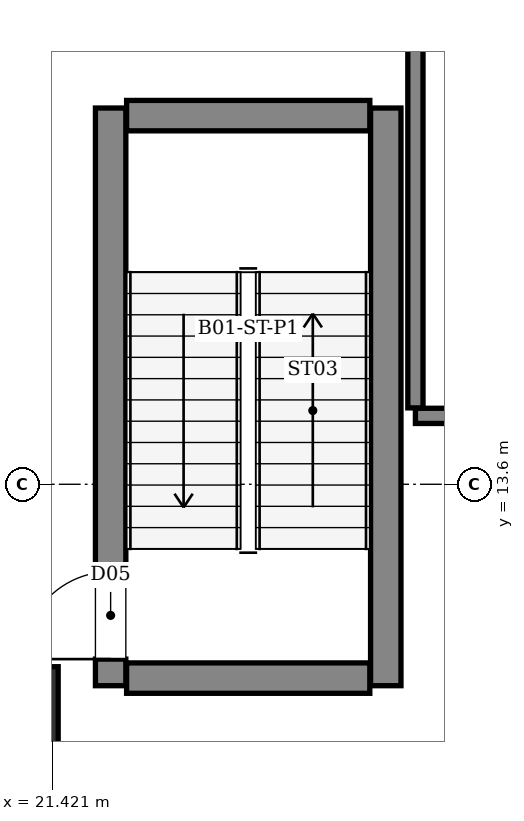
"""IFC4 building model, lengths in metres.
Left out: names, types, materials, properties, quantities, classifications, styles, units other than length and angle.
Written with IfcOpenShell. Run it as: python <this file> out.ifc"""

import sys

from ifc_helpers import new_model, si_unit, direction, frame, frame_2d, origin, origin_2d, place, context, subcontext, project, spatial, rectangle, extrude, element, fill, save


model = new_model("IFC4")
c1 = context("Model", 3, precision=1e-05, world=origin(), true_north=direction((0.0, 1.0)))
c2 = subcontext(c1, "Body", "Model", "MODEL_VIEW")
j1 = project(units=[si_unit("LENGTHUNIT", "METRE"), si_unit("PLANEANGLEUNIT", "RADIAN")], contexts=[c1])
p1 = place(None, origin())
s1 = spatial("IfcSite", under=j1, at=p1, CompositionType="ELEMENT")
p2 = place(p1, origin())
s2 = spatial("IfcBuilding", under=s1, at=p2, CompositionType="ELEMENT")
p3 = place(p2, frame((0.0, 0.0, -4.8)))
s3 = spatial("IfcBuildingStorey", under=s2, at=p3, CompositionType="ELEMENT", Elevation=-4.8)
p4 = place(p3, frame((20.8, 10.5, 0.0), z_axis=(0.0, 0.0, 1.0), x_axis=(1.0, 0.0, 0.0)))
e1 = element("IfcColumn", 1, at=p4, inside=s3, PredefinedType="COLUMN", context=c2, shape_type="SweptSolid", body=[
    extrude(rectangle(XDim=1.4, YDim=1.4, at=origin_2d()), origin(), (0.0, 0.0, 1.0), 4.8),
])
p5 = place(p3, frame((22.19, 10.95, 0.0), z_axis=(0.0, 0.0, 1.0), x_axis=(0.0, 1.0, 0.0)))
e2 = element("IfcWall", 2, at=p5, inside=s3, PredefinedType="SHEAR", context=c2, shape_type="SweptSolid", body=[
    extrude(rectangle(XDim=7.6, YDim=0.4, at=frame_2d((3.8, 0.0))), origin(), (0.0, 0.0, 1.0), 4.35),
])
p6 = place(p5, frame((0.35, 0.0, 0.0)))
e3 = element("IfcOpeningElement", 3, at=p6, cuts=e2, PredefinedType="OPENING", context=c2, shape_type="SweptSolid", body=[
    extrude(rectangle(XDim=1.15, YDim=2.15, at=frame_2d((0.575, 1.075))), frame((0.0, 0.21, 0.0), z_axis=(0.0, -1.0, 0.0), x_axis=(1.0, 0.0, 0.0)), (0.0, 0.0, 1.0), 0.42),
])
p7 = place(p3, frame((25.81, 10.95, 0.0), z_axis=(0.0, 0.0, 1.0), x_axis=(0.0, 1.0, 0.0)))
e4 = element("IfcWall", 4, at=p7, inside=s3, PredefinedType="SHEAR", context=c2, shape_type="SweptSolid", body=[
    extrude(rectangle(XDim=7.6, YDim=0.4, at=frame_2d((3.8, 0.0))), origin(), (0.0, 0.0, 1.0), 4.35),
])
for number, where, z_axis, x_axis in (
    (5, (22.4, 11.05, 0.0), (0.0, 0.0, 1.0), (1.0, 0.0, 0.0)),
    (6, (22.4, 18.45, 0.0), (0.0, 0.0, 1.0), (1.0, 0.0, 0.0)),
):
    element("IfcWall", number, at=place(p3, frame(where, z_axis=z_axis, x_axis=x_axis)), inside=s3, PredefinedType="SHEAR", context=c2, shape_type="SweptSolid", body=[
        extrude(rectangle(XDim=3.2, YDim=0.4, at=frame_2d((1.6, 0.0))), origin(), (0.0, 0.0, 1.0), 4.35),
    ])
p8 = place(p3, frame((26.2, 14.5, 0.0), z_axis=(0.0, 0.0, 1.0), x_axis=(1.0, 0.0, 0.0)))
e7 = element("IfcWall", 7, at=p8, inside=s3, PredefinedType="SOLIDWALL", context=c2, shape_type="SweptSolid", body=[
    extrude(rectangle(XDim=7.8, YDim=0.2, at=frame_2d((3.9, 0.0))), origin(), (0.0, 0.0, 1.0), 4.35),
])
p9 = place(p8, frame((3.2, 0.0, 0.0)))
e8 = element("IfcOpeningElement", 8, at=p9, cuts=e7, PredefinedType="OPENING", context=c2, shape_type="SweptSolid", body=[
    extrude(rectangle(XDim=1.4, YDim=2.15, at=frame_2d((0.7, 1.075))), frame((0.0, 0.11, 0.0), z_axis=(0.0, -1.0, 0.0), x_axis=(1.0, 0.0, 0.0)), (0.0, 0.0, 1.0), 0.22),
])
p10 = place(p3, frame((26.2, 14.605, 0.0), z_axis=(0.0, 0.0, 1.0), x_axis=(0.0, 1.0, 0.0)))
e9 = element("IfcWall", 9, at=p10, inside=s3, PredefinedType="SOLIDWALL", context=c2, shape_type="SweptSolid", body=[
    extrude(rectangle(XDim=5.695, YDim=0.2, at=frame_2d((2.848, 0.0))), origin(), (0.0, 0.0, 1.0), 3.835),
])
p11 = place(p6, origin())
e10 = element("IfcDoor", 10, at=p11, inside=s3, OperationType="SINGLE_SWING_LEFT", PredefinedType="DOOR", context=c2, shape_type="SweptSolid", body=[
    extrude(rectangle(XDim=1.15, YDim=2.15, at=frame_2d((0.575, 1.075))), frame((0.0, 0.025, 0.0), z_axis=(0.0, -1.0, 0.0), x_axis=(1.0, 0.0, 0.0)), (0.0, 0.0, 1.0), 0.05),
])
fill(e3, e10)
save(model, sys.argv[1])
